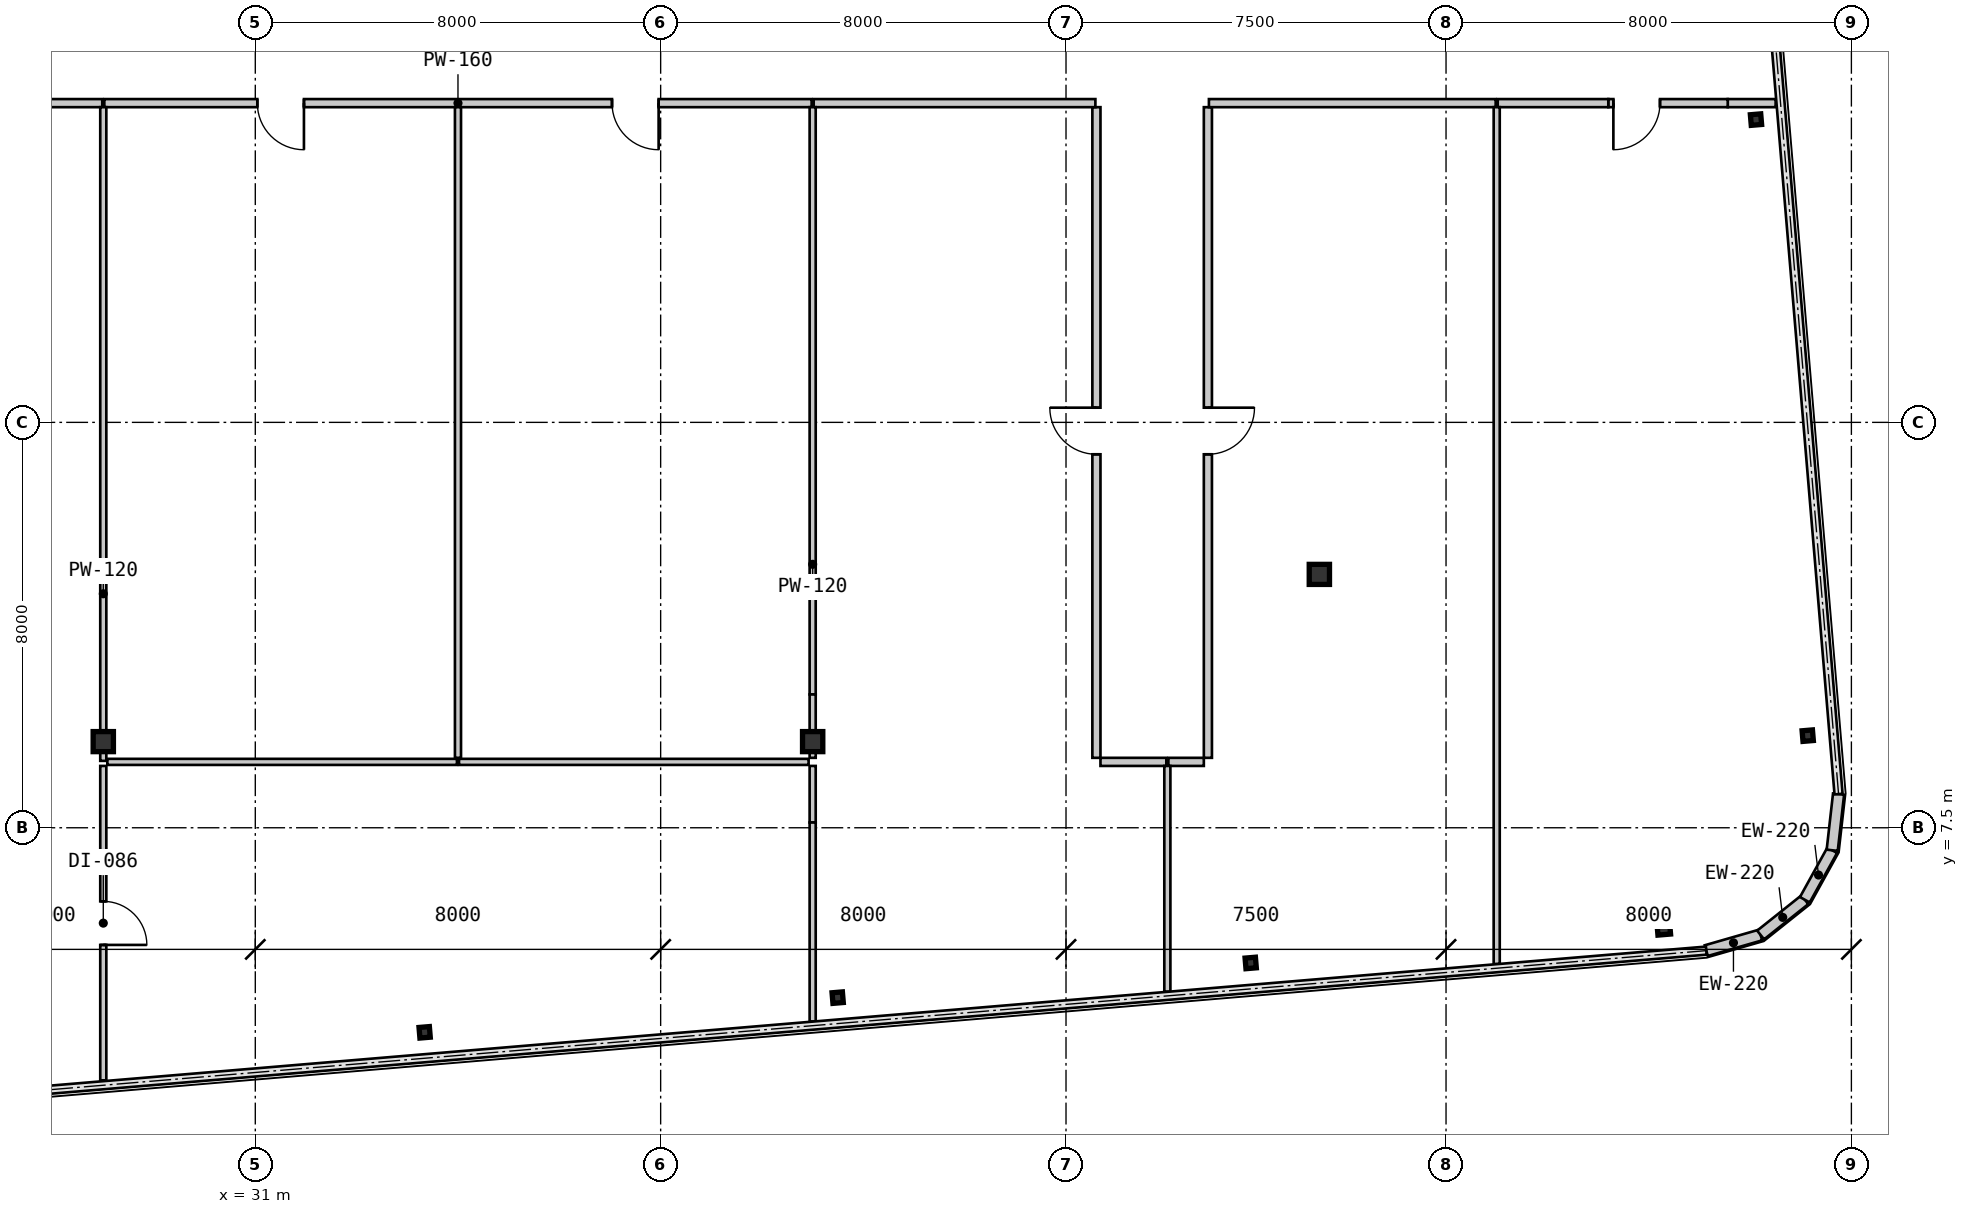
"""IFC4 building model, lengths in metres.
Left out: names, types, materials, properties, quantities, classifications, styles, units other than length and angle.
Written with IfcOpenShell. Run it as: python <this file> out.ifc"""

import sys

from ifc_helpers import new_model, si_unit, direction, frame, frame_2d, origin, origin_2d, place, context, subcontext, project, spatial, rectangle, hollow_rectangle, i_section, extrude, source, transform, mapped, element, fill, save


model = new_model("IFC4")
c1 = context("Model", 3, precision=1e-05, world=origin(), true_north=direction((0.0, 1.0)))
c2 = subcontext(c1, "Body", "Model", "MODEL_VIEW")
j1 = project(units=[si_unit("LENGTHUNIT", "METRE"), si_unit("PLANEANGLEUNIT", "RADIAN")], contexts=[c1])
p1 = place(None, origin())
s1 = spatial("IfcSite", under=j1, at=p1, CompositionType="ELEMENT")
p2 = place(p1, origin())
s2 = spatial("IfcBuilding", under=s1, at=p2, CompositionType="ELEMENT")
p3 = place(p2, frame((0.0, 0.0, 172.55)))
s3 = spatial("IfcBuildingStorey", under=s2, at=p3, CompositionType="ELEMENT", Elevation=172.55)
m1 = source(origin(), c2, "Body", "SweptSolid", [
    extrude(i_section(OverallWidth=0.4, OverallDepth=0.396, WebThickness=0.022, FlangeThickness=0.034, at=origin_2d()), origin(), (0.0, 0.0, 1.0), 3.15),
])
for number, where, z_axis, x_axis in (
    (1, (28.0, 9.2, 0.0), (0.0, 0.0, 1.0), (1.0, 0.0, 0.0)),
    (2, (42.0, 9.2, 0.0), (0.0, 0.0, 1.0), (1.0, 0.0, 0.0)),
    (3, (52.0, 12.5, 0.0), (0.0, 0.0, 1.0), (1.0, 0.0, 0.0)),
):
    element("IfcColumn", number, at=place(p3, frame(where, z_axis=z_axis, x_axis=x_axis)), inside=s3, PredefinedType="COLUMN", context=c2, shape_type="MappedRepresentation", body=[
        mapped(m1, transform((0.0, 0.0, 0.0), scale=1.0)),
    ])
m2 = source(origin(), c2, "Body", "SweptSolid", [
    extrude(i_section(OverallWidth=0.205, OverallDepth=0.21, WebThickness=0.009, FlangeThickness=0.014, at=origin_2d()), origin(), (0.0, 0.0, 1.0), 3.15),
])
for number, where, z_axis, x_axis in (
    (4, (34.342, 3.463, 0.0), (0.0, 0.0, 1.0), (0.996, 0.084, 0.0)),
    (5, (42.494, 4.147, 0.0), (0.0, 0.0, 1.0), (0.996, 0.084, 0.0)),
    (6, (50.645, 4.832, 0.0), (0.0, 0.0, 1.0), (0.996, 0.084, 0.0)),
):
    element("IfcColumn", number, at=place(p3, frame(where, z_axis=z_axis, x_axis=x_axis)), inside=s3, PredefinedType="COLUMN", context=c2, shape_type="MappedRepresentation", body=[
        mapped(m2, transform((0.0, 0.0, 0.0), scale=1.0)),
    ])
m3 = source(origin(), c2, "Body", "SweptSolid", [
    extrude(hollow_rectangle(XDim=0.25, YDim=0.25, WallThickness=0.01, at=origin_2d()), origin(), (0.0, 0.0, 1.0), 3.15),
])
p4 = place(p3, frame((58.796, 5.516, 0.0), z_axis=(0.0, 0.0, 1.0), x_axis=(0.99649285925, 0.083677843332, 0.0)))
e7 = element("IfcColumn", 7, at=p4, inside=s3, PredefinedType="COLUMN", context=c2, shape_type="MappedRepresentation", body=[
    mapped(m3, transform((0.0, 0.0, 0.0), scale=1.0)),
])
for number, where, z_axis, x_axis in (
    (8, (61.638, 9.318, 0.0), (0.0, 0.0, 1.0), (0.996, 0.084, 0.0)),
    (9, (60.617, 21.475, 0.0), (0.0, 0.0, 1.0), (0.996, 0.084, 0.0)),
):
    element("IfcColumn", number, at=place(p3, frame(where, z_axis=z_axis, x_axis=x_axis)), inside=s3, PredefinedType="COLUMN", context=c2, shape_type="MappedRepresentation", body=[
        mapped(m2, transform((0.0, 0.0, 0.0), scale=1.0)),
    ])
m4 = source(origin(), c2, "Body", "SweptSolid", [
    extrude(rectangle(XDim=1.116, YDim=0.22, at=frame_2d((0.558, 0.0))), origin(), (0.0, 0.0, 1.0), 2.93),
])
for number, where, z_axis, x_axis in (
    (10, (59.636, 5.075, 0.0), (0.0, 0.0, 1.0), (0.961, 0.277, 0.0)),
    (11, (60.708, 5.384, 0.0), (0.0, 0.0, 1.0), (0.782, 0.623, 0.0)),
    (12, (61.581, 6.079, 0.0), (0.0, 0.0, 1.0), (0.484, 0.875, 0.0)),
    (13, (62.121, 7.056, 0.0), (0.0, 0.0, 1.0), (0.112, 0.994, 0.0)),
):
    element("IfcWall", number, at=place(p3, frame(where, z_axis=z_axis, x_axis=x_axis)), inside=s3, PredefinedType="SOLIDWALL", context=c2, shape_type="MappedRepresentation", body=[
        mapped(m4, transform((0.0, 0.0, 0.0), scale=1.0)),
    ])
m5 = source(origin(), c2, "Body", "SweptSolid", [
    extrude(rectangle(XDim=5.56, YDim=0.16, at=frame_2d((2.78, 0.0))), origin(), (0.0, 0.0, 1.0), 2.93),
])
p5 = place(p3, frame((27.98, 21.8, 0.0), z_axis=(0.0, 0.0, 1.0), x_axis=(-1.0, 0.0, 0.0)))
e14 = element("IfcWall", 14, at=p5, inside=s3, PredefinedType="PARTITIONING", context=c2, shape_type="MappedRepresentation", body=[
    mapped(m5, transform((0.0, 0.0, 0.0), scale=1.0)),
])
m6 = source(origin(), c2, "Body", "SweptSolid", [
    extrude(rectangle(XDim=6.959, YDim=0.16, at=frame_2d((3.48, 0.0))), origin(), (0.0, 0.0, 1.0), 2.93),
])
p6 = place(p3, frame((34.98, 21.8, 0.0), z_axis=(0.0, 0.0, 1.0), x_axis=(-1.0, 0.0, 0.0)))
e15 = element("IfcWall", 15, at=p6, inside=s3, PredefinedType="PARTITIONING", context=c2, shape_type="MappedRepresentation", body=[
    mapped(m6, transform((0.0, 0.0, 0.0), scale=1.0)),
])
m7 = source(origin(), c2, "Body", "SweptSolid", [
    extrude(rectangle(XDim=0.92, YDim=2.1, at=frame_2d((0.46, 1.05))), frame((0.0, 0.09, 0.0), z_axis=(0.0, -1.0, 0.0), x_axis=(1.0, 0.0, 0.0)), (0.0, 0.0, 1.0), 0.18),
])
p7 = place(p6, frame((3.02, 0.0, 0.0)))
e16 = element("IfcOpeningElement", 16, at=p7, cuts=e15, PredefinedType="OPENING", context=c2, shape_type="MappedRepresentation", body=[
    mapped(m7, transform((0.0, 0.0, 0.0), scale=1.0)),
])
p8 = place(p3, frame((41.98, 21.8, 0.0), z_axis=(0.0, 0.0, 1.0), x_axis=(-1.0, 0.0, 0.0)))
e17 = element("IfcWall", 17, at=p8, inside=s3, PredefinedType="PARTITIONING", context=c2, shape_type="MappedRepresentation", body=[
    mapped(m6, transform((0.0, 0.0, 0.0), scale=1.0)),
])
p9 = place(p8, frame((3.02, 0.0, 0.0)))
e18 = element("IfcOpeningElement", 18, at=p9, cuts=e17, PredefinedType="OPENING", context=c2, shape_type="MappedRepresentation", body=[
    mapped(m7, transform((0.0, 0.0, 0.0), scale=1.0)),
])
m8 = source(origin(), c2, "Body", "SweptSolid", [
    extrude(rectangle(XDim=12.84, YDim=0.16, at=frame_2d((6.42, 0.0))), origin(), (0.0, 0.0, 1.0), 2.93),
])
p10 = place(p3, frame((47.6, 8.88, 0.0), z_axis=(0.0, 0.0, 1.0), x_axis=(0.0, 1.0, 0.0)))
e19 = element("IfcWall", 19, at=p10, inside=s3, PredefinedType="PARTITIONING", context=c2, shape_type="MappedRepresentation", body=[
    mapped(m8, transform((0.0, 0.0, 0.0), scale=1.0)),
])
p11 = place(p10, frame((5.99, 0.0, 0.0)))
e20 = element("IfcOpeningElement", 20, at=p11, cuts=e19, PredefinedType="OPENING", context=c2, shape_type="MappedRepresentation", body=[
    mapped(m7, transform((0.0, 0.0, 0.0), scale=1.0)),
])
p12 = place(p3, frame((47.58, 21.8, 0.0), z_axis=(0.0, 0.0, 1.0), x_axis=(-1.0, 0.0, 0.0)))
e21 = element("IfcWall", 21, at=p12, inside=s3, PredefinedType="PARTITIONING", context=c2, shape_type="MappedRepresentation", body=[
    mapped(m5, transform((0.0, 0.0, 0.0), scale=1.0)),
])
m9 = source(origin(), c2, "Body", "SweptSolid", [
    extrude(rectangle(XDim=1.3, YDim=0.16, at=frame_2d((0.65, 0.0))), origin(), (0.0, 0.0, 1.0), 2.93),
])
p13 = place(p3, frame((48.98, 8.8, 0.0), z_axis=(0.0, 0.0, 1.0), x_axis=(-1.0, 0.0, 0.0)))
e22 = element("IfcWall", 22, at=p13, inside=s3, PredefinedType="PARTITIONING", context=c2, shape_type="MappedRepresentation", body=[
    mapped(m9, transform((0.0, 0.0, 0.0), scale=1.0)),
])
p14 = place(p3, frame((49.8, 21.72, 0.0), z_axis=(0.0, 0.0, 1.0), x_axis=(0.0, -1.0, 0.0)))
e23 = element("IfcWall", 23, at=p14, inside=s3, PredefinedType="PARTITIONING", context=c2, shape_type="MappedRepresentation", body=[
    mapped(m8, transform((0.0, 0.0, 0.0), scale=1.0)),
])
p15 = place(p14, frame((5.93, 0.0, 0.0)))
e24 = element("IfcOpeningElement", 24, at=p15, cuts=e23, PredefinedType="OPENING", context=c2, shape_type="MappedRepresentation", body=[
    mapped(m7, transform((0.0, 0.0, 0.0), scale=1.0)),
])
m10 = source(origin(), c2, "Body", "SweptSolid", [
    extrude(rectangle(XDim=5.659, YDim=0.16, at=frame_2d((2.83, 0.0))), origin(), (0.0, 0.0, 1.0), 2.93),
])
p16 = place(p3, frame((55.48, 21.8, 0.0), z_axis=(0.0, 0.0, 1.0), x_axis=(-1.0, 0.0, 0.0)))
e25 = element("IfcWall", 25, at=p16, inside=s3, PredefinedType="PARTITIONING", context=c2, shape_type="MappedRepresentation", body=[
    mapped(m10, transform((0.0, 0.0, 0.0), scale=1.0)),
])
m11 = source(origin(), c2, "Body", "SweptSolid", [
    extrude(rectangle(XDim=0.7, YDim=0.16, at=frame_2d((0.35, 0.0))), origin(), (0.0, 0.0, 1.0), 2.93),
])
p17 = place(p3, frame((49.72, 8.8, 0.0), z_axis=(0.0, 0.0, 1.0), x_axis=(-1.0, 0.0, 0.0)))
e26 = element("IfcWall", 26, at=p17, inside=s3, PredefinedType="PARTITIONING", context=c2, shape_type="MappedRepresentation", body=[
    mapped(m11, transform((0.0, 0.0, 0.0), scale=1.0)),
])
m12 = source(origin(), c2, "Body", "SweptSolid", [
    extrude(rectangle(XDim=0.945, YDim=0.16, at=frame_2d((0.473, 0.0))), origin(), (0.0, 0.0, 1.0), 2.93),
])
p18 = place(p3, frame((61.005, 21.8, 0.0), z_axis=(0.0, 0.0, 1.0), x_axis=(-1.0, 0.0, 0.0)))
e27 = element("IfcWall", 27, at=p18, inside=s3, PredefinedType="PARTITIONING", context=c2, shape_type="MappedRepresentation", body=[
    mapped(m12, transform((0.0, 0.0, 0.0), scale=1.0)),
])
m13 = source(origin(), c2, "Body", "SweptSolid", [
    extrude(rectangle(XDim=2.357, YDim=0.16, at=frame_2d((1.178, 0.0))), origin(), (0.0, 0.0, 1.0), 2.47),
])
p19 = place(p3, frame((60.059, 21.8, 0.0), z_axis=(0.0, 0.0, 1.0), x_axis=(-1.0, 0.0, 0.0)))
e28 = element("IfcWall", 28, at=p19, inside=s3, PredefinedType="PARTITIONING", context=c2, shape_type="MappedRepresentation", body=[
    mapped(m13, transform((0.0, 0.0, 0.0), scale=1.0)),
])
p20 = place(p19, frame((1.337, 0.0, 0.0)))
e29 = element("IfcOpeningElement", 29, at=p20, cuts=e28, PredefinedType="OPENING", context=c2, shape_type="MappedRepresentation", body=[
    mapped(m7, transform((0.0, 0.0, 0.0), scale=1.0)),
])
m14 = source(origin(), c2, "Body", "SweptSolid", [
    extrude(rectangle(XDim=2.182, YDim=0.16, at=frame_2d((1.091, 0.0))), origin(), (0.0, 0.0, 1.0), 2.93),
])
p21 = place(p3, frame((57.702, 21.8, 0.0), z_axis=(0.0, 0.0, 1.0), x_axis=(-1.0, 0.0, 0.0)))
e30 = element("IfcWall", 30, at=p21, inside=s3, PredefinedType="PARTITIONING", context=c2, shape_type="MappedRepresentation", body=[
    mapped(m14, transform((0.0, 0.0, 0.0), scale=1.0)),
])
m15 = source(origin(), c2, "Body", "SweptSolid", [
    extrude(rectangle(XDim=6.204, YDim=0.12, at=frame_2d((3.102, 0.0))), origin(), (0.0, 0.0, 1.0), 2.93),
])
p22 = place(p3, frame((28.0, 2.516, 0.0), z_axis=(0.0, 0.0, 1.0), x_axis=(0.0, 1.0, 0.0)))
e31 = element("IfcWall", 31, at=p22, inside=s3, PredefinedType="PARTITIONING", context=c2, shape_type="MappedRepresentation", body=[
    mapped(m15, transform((0.0, 0.0, 0.0), scale=1.0)),
])
m16 = source(origin(), c2, "Body", "SweptSolid", [
    extrude(rectangle(XDim=0.86, YDim=2.1, at=frame_2d((0.43, 1.05))), frame((0.0, 0.07, 0.0), z_axis=(0.0, -1.0, 0.0), x_axis=(1.0, 0.0, 0.0)), (0.0, 0.0, 1.0), 0.14),
])
p23 = place(p22, frame((2.672, 0.0, 0.0)))
e32 = element("IfcOpeningElement", 32, at=p23, cuts=e31, PredefinedType="OPENING", context=c2, shape_type="MappedRepresentation", body=[
    mapped(m16, transform((0.0, 0.0, 0.0), scale=1.0)),
])
m17 = source(origin(), c2, "Body", "SweptSolid", [
    extrude(rectangle(XDim=6.9, YDim=0.12, at=frame_2d((3.45, 0.0))), origin(), (0.0, 0.0, 1.0), 2.93),
])
for number, where, z_axis, x_axis in (
    (33, (28.08, 8.8, 0.0), (0.0, 0.0, 1.0), (1.0, 0.0, 0.0)),
    (34, (35.02, 8.8, 0.0), (0.0, 0.0, 1.0), (1.0, 0.0, 0.0)),
):
    element("IfcWall", number, at=place(p3, frame(where, z_axis=z_axis, x_axis=x_axis)), inside=s3, PredefinedType="PARTITIONING", context=c2, shape_type="MappedRepresentation", body=[
        mapped(m17, transform((0.0, 0.0, 0.0), scale=1.0)),
    ])
m18 = source(origin(), c2, "Body", "SweptSolid", [
    extrude(rectangle(XDim=1.116, YDim=0.12, at=frame_2d((0.558, 0.0))), origin(), (0.0, 0.0, 1.0), 2.47),
])
p24 = place(p3, frame((42.0, 8.72, 0.0), z_axis=(0.0, 0.0, 1.0), x_axis=(0.0, -1.0, 0.0)))
e35 = element("IfcWall", 35, at=p24, inside=s3, PredefinedType="PARTITIONING", context=c2, shape_type="MappedRepresentation", body=[
    mapped(m18, transform((0.0, 0.0, 0.0), scale=1.0)),
])
m19 = source(origin(), c2, "Body", "SweptSolid", [
    extrude(rectangle(XDim=3.926, YDim=0.12, at=frame_2d((1.963, 0.0))), origin(), (0.0, 0.0, 1.0), 2.93),
])
p25 = place(p3, frame((42.0, 7.604, 0.0), z_axis=(0.0, 0.0, 1.0), x_axis=(0.0, -1.0, 0.0)))
e36 = element("IfcWall", 36, at=p25, inside=s3, PredefinedType="PARTITIONING", context=c2, shape_type="MappedRepresentation", body=[
    mapped(m19, transform((0.0, 0.0, 0.0), scale=1.0)),
])
m20 = source(origin(), c2, "Body", "SweptSolid", [
    extrude(rectangle(XDim=12.52, YDim=0.12, at=frame_2d((6.26, 0.0))), origin(), (0.0, 0.0, 1.0), 2.328),
])
p26 = place(p3, frame((28.0, 21.72, 0.0), z_axis=(0.0, 0.0, 1.0), x_axis=(0.0, -1.0, 0.0)))
e37 = element("IfcWall", 37, at=p26, inside=s3, PredefinedType="PARTITIONING", context=c2, shape_type="MappedRepresentation", body=[
    mapped(m20, transform((0.0, 0.0, 0.0), scale=1.0)),
])
m21 = source(origin(), c2, "Body", "SweptSolid", [
    extrude(rectangle(XDim=0.38, YDim=0.12, at=frame_2d((0.19, 0.0))), origin(), (0.0, 0.0, 1.0), 2.93),
])
p27 = place(p3, frame((28.0, 9.2, 0.0), z_axis=(0.0, 0.0, 1.0), x_axis=(0.0, -1.0, 0.0)))
e38 = element("IfcWall", 38, at=p27, inside=s3, PredefinedType="PARTITIONING", context=c2, shape_type="MappedRepresentation", body=[
    mapped(m21, transform((0.0, 0.0, 0.0), scale=1.0)),
])
m22 = source(origin(), c2, "Body", "SweptSolid", [
    extrude(rectangle(XDim=12.84, YDim=0.12, at=frame_2d((6.42, 0.0))), origin(), (0.0, 0.0, 1.0), 2.93),
])
p28 = place(p3, frame((35.0, 21.72, 0.0), z_axis=(0.0, 0.0, 1.0), x_axis=(0.0, -1.0, 0.0)))
e39 = element("IfcWall", 39, at=p28, inside=s3, PredefinedType="PARTITIONING", context=c2, shape_type="MappedRepresentation", body=[
    mapped(m22, transform((0.0, 0.0, 0.0), scale=1.0)),
])
m23 = source(origin(), c2, "Body", "SweptSolid", [
    extrude(rectangle(XDim=11.59, YDim=0.12, at=frame_2d((5.795, 0.0))), origin(), (0.0, 0.0, 1.0), 2.93),
])
p29 = place(p3, frame((42.0, 21.72, 0.0), z_axis=(0.0, 0.0, 1.0), x_axis=(0.0, -1.0, 0.0)))
e40 = element("IfcWall", 40, at=p29, inside=s3, PredefinedType="PARTITIONING", context=c2, shape_type="MappedRepresentation", body=[
    mapped(m23, transform((0.0, 0.0, 0.0), scale=1.0)),
])
m24 = source(origin(), c2, "Body", "SweptSolid", [
    extrude(rectangle(XDim=0.942, YDim=0.12, at=frame_2d((0.471, 0.0))), origin(), (0.0, 0.0, 1.0), 2.328),
])
p30 = place(p3, frame((42.0, 10.13, 0.0), z_axis=(0.0, 0.0, 1.0), x_axis=(0.0, -1.0, 0.0)))
e41 = element("IfcWall", 41, at=p30, inside=s3, PredefinedType="PARTITIONING", context=c2, shape_type="MappedRepresentation", body=[
    mapped(m24, transform((0.0, 0.0, 0.0), scale=1.0)),
])
m25 = source(origin(), c2, "Body", "SweptSolid", [
    extrude(rectangle(XDim=0.309, YDim=0.12, at=frame_2d((0.154, 0.0))), origin(), (0.0, 0.0, 1.0), 2.93),
])
p31 = place(p3, frame((42.0, 9.189, 0.0), z_axis=(0.0, 0.0, 1.0), x_axis=(0.0, -1.0, 0.0)))
e42 = element("IfcWall", 42, at=p31, inside=s3, PredefinedType="PARTITIONING", context=c2, shape_type="MappedRepresentation", body=[
    mapped(m25, transform((0.0, 0.0, 0.0), scale=1.0)),
])
m26 = source(origin(), c2, "Body", "SweptSolid", [
    extrude(rectangle(XDim=4.454, YDim=0.12, at=frame_2d((2.227, 0.0))), origin(), (0.0, 0.0, 1.0), 2.93),
])
p32 = place(p3, frame((49.0, 8.72, 0.0), z_axis=(0.0, 0.0, 1.0), x_axis=(0.0, -1.0, 0.0)))
e43 = element("IfcWall", 43, at=p32, inside=s3, PredefinedType="PARTITIONING", context=c2, shape_type="MappedRepresentation", body=[
    mapped(m26, transform((0.0, 0.0, 0.0), scale=1.0)),
])
m27 = source(origin(), c2, "Body", "SweptSolid", [
    extrude(rectangle(XDim=16.908, YDim=0.12, at=frame_2d((8.454, 0.0))), origin(), (0.0, 0.0, 1.0), 2.93),
])
p33 = place(p3, frame((55.5, 21.72, 0.0), z_axis=(0.0, 0.0, 1.0), x_axis=(0.0, -1.0, 0.0)))
e44 = element("IfcWall", 44, at=p33, inside=s3, PredefinedType="PARTITIONING", context=c2, shape_type="MappedRepresentation", body=[
    mapped(m27, transform((0.0, 0.0, 0.0), scale=1.0)),
])
m28 = source(origin(), c2, "Body", "SweptSolid", [
    extrude(rectangle(XDim=0.92, YDim=2.1, at=frame_2d((0.46, 1.05))), frame((0.0, 0.025, 0.0), z_axis=(0.0, -1.0, 0.0), x_axis=(1.0, 0.0, 0.0)), (0.0, 0.0, 1.0), 0.05),
])
p34 = place(p7, origin())
e45 = element("IfcDoor", 45, at=p34, inside=s3, OperationType="SINGLE_SWING_LEFT", PredefinedType="DOOR", context=c2, shape_type="MappedRepresentation", body=[
    mapped(m28, transform((0.0, 0.0, 0.0), scale=1.0)),
])
fill(e16, e45)
p35 = place(p9, origin())
e46 = element("IfcDoor", 46, at=p35, inside=s3, OperationType="SINGLE_SWING_LEFT", PredefinedType="DOOR", context=c2, shape_type="MappedRepresentation", body=[
    mapped(m28, transform((0.0, 0.0, 0.0), scale=1.0)),
])
fill(e18, e46)
p36 = place(p11, origin())
e47 = element("IfcDoor", 47, at=p36, inside=s3, OperationType="SINGLE_SWING_RIGHT", PredefinedType="DOOR", context=c2, shape_type="MappedRepresentation", body=[
    mapped(m28, transform((0.0, 0.0, 0.0), scale=1.0)),
])
fill(e20, e47)
p37 = place(p15, origin())
e48 = element("IfcDoor", 48, at=p37, inside=s3, OperationType="SINGLE_SWING_LEFT", PredefinedType="DOOR", context=c2, shape_type="MappedRepresentation", body=[
    mapped(m28, transform((0.0, 0.0, 0.0), scale=1.0)),
])
fill(e24, e48)
p38 = place(p20, origin())
e49 = element("IfcDoor", 49, at=p38, inside=s3, OperationType="SINGLE_SWING_RIGHT", PredefinedType="DOOR", context=c2, shape_type="MappedRepresentation", body=[
    mapped(m28, transform((0.0, 0.0, 0.0), scale=1.0)),
])
fill(e29, e49)
m29 = source(origin(), c2, "Body", "SweptSolid", [
    extrude(rectangle(XDim=0.86, YDim=2.1, at=frame_2d((0.43, 1.05))), frame((0.0, 0.025, 0.0), z_axis=(0.0, -1.0, 0.0), x_axis=(1.0, 0.0, 0.0)), (0.0, 0.0, 1.0), 0.05),
])
p39 = place(p23, frame((0.86, 0.0, 0.0), z_axis=(0.0, 0.0, 1.0), x_axis=(-1.0, 0.0, 0.0)))
e50 = element("IfcDoor", 50, at=p39, inside=s3, OperationType="SINGLE_SWING_RIGHT", PredefinedType="DOOR", context=c2, shape_type="MappedRepresentation", body=[
    mapped(m29, transform((0.0, 0.0, 0.0), scale=1.0)),
])
fill(e32, e50)
save(model, sys.argv[1])
